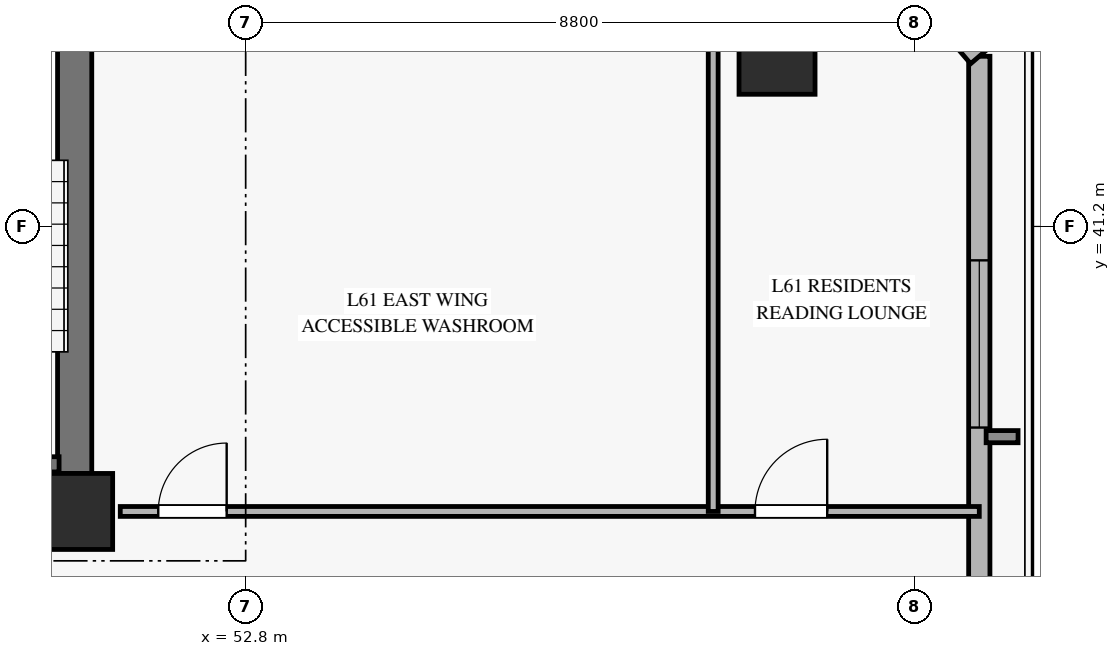
"""IFC4 building model, lengths in metres.
Left out: names, types, materials, properties, quantities, classifications, styles, units other than length and angle.
Written with IfcOpenShell. Run it as: python <this file> out.ifc"""

import sys

from ifc_helpers import new_model, si_unit, direction, frame, frame_2d, origin, origin_2d, place, context, subcontext, project, spatial, rectangle, hollow_rectangle, extrude, source, transform, mapped, element, fill, save


model = new_model("IFC4")
c1 = context("Model", 3, precision=1e-05, world=origin(), true_north=direction((0.0, 1.0)))
c2 = subcontext(c1, "Body", "Model", "MODEL_VIEW")
j1 = project(units=[si_unit("LENGTHUNIT", "METRE"), si_unit("PLANEANGLEUNIT", "RADIAN")], contexts=[c1])
p1 = place(None, origin())
s1 = spatial("IfcSite", under=j1, at=p1, CompositionType="ELEMENT")
p2 = place(p1, origin())
s2 = spatial("IfcBuilding", under=s1, at=p2, CompositionType="ELEMENT")
p3 = place(p2, frame((0.0, 0.0, 241.7)))
s3 = spatial("IfcBuildingStorey", under=s2, at=p3, CompositionType="ELEMENT", Elevation=241.7)
m1 = source(origin(), c2, "Body", "SweptSolid", [
    extrude(rectangle(XDim=1.0, YDim=1.0, at=origin_2d()), origin(), (0.0, 0.0, 1.0), 3.185),
])
p4 = place(p3, frame((50.55, 37.45, 0.0), z_axis=(0.0, 0.0, 1.0), x_axis=(1.0, 0.0, 0.0)))
e1 = element("IfcColumn", 1, at=p4, inside=s3, PredefinedType="PILASTER", context=c2, shape_type="MappedRepresentation", body=[
    mapped(m1, transform((0.0, 0.0, 0.0), x_axis=(1.0, 0.0, 0.0), y_axis=(0.0, 1.0, 0.0), z_axis=(0.0, 0.0, 1.0), scale=1.0)),
])
p5 = place(p3, frame((50.55, 37.95, 0.0), z_axis=(0.0, 0.0, 1.0), x_axis=(0.0, 1.0, 0.0)))
e2 = element("IfcWall", 2, at=p5, inside=s3, PredefinedType="SHEAR", context=c2, shape_type="SweptSolid", body=[
    extrude(rectangle(XDim=8.1, YDim=0.45, at=frame_2d((4.05, 0.0))), origin(), (0.0, 0.0, 1.0), 3.185),
])
m2 = source(origin(), c2, "Body", "SweptSolid", [
    extrude(hollow_rectangle(XDim=1.0, YDim=1.0, WallThickness=0.045, at=origin_2d()), origin(), (0.0, 0.0, 1.0), 3.185),
])
p6 = place(p3, frame((59.791, 43.439, 0.0), z_axis=(0.0, 0.0, 1.0), x_axis=(1.0, 0.0, 0.0)))
e3 = element("IfcColumn", 3, at=p6, inside=s3, PredefinedType="COLUMN", context=c2, shape_type="MappedRepresentation", body=[
    mapped(m2, transform((0.0, 0.0, 0.0), x_axis=(1.0, 0.0, 0.0), y_axis=(0.0, 1.0, 0.0), z_axis=(0.0, 0.0, 1.0), scale=1.0)),
])
p7 = place(p3, frame((62.452, 30.391, 0.0), z_axis=(0.0, 0.0, 1.0), x_axis=(0.0, 1.0, 0.0)))
e4 = element("IfcWall", 4, at=p7, inside=s3, PredefinedType="SOLIDWALL", context=c2, shape_type="SweptSolid", body=[
    extrude(rectangle(XDim=13.048, YDim=0.28, at=frame_2d((6.524, 0.0))), origin(), (0.0, 0.0, 1.0), 2.815),
])
p8 = place(p7, frame((8.163, 0.0, 0.45)))
e5 = element("IfcOpeningElement", 5, at=p8, cuts=e4, PredefinedType="OPENING", context=c2, shape_type="SweptSolid", body=[
    extrude(rectangle(XDim=2.2, YDim=2.1, at=frame_2d((1.1, 1.05))), frame((0.0, 0.15, 0.0), z_axis=(0.0, -1.0, 0.0), x_axis=(1.0, 0.0, 0.0)), (0.0, 0.0, 1.0), 0.3),
])
p9 = place(p3, frame((62.452, 43.439, 0.0), z_axis=(0.0, 0.0, 1.0), x_axis=(-0.651013940872, 0.759065773692, 0.0)))
e6 = element("IfcWall", 6, at=p9, inside=s3, PredefinedType="SOLIDWALL", context=c2, shape_type="SweptSolid", body=[
    extrude(rectangle(XDim=3.703, YDim=0.3, at=frame_2d((1.852, 0.0))), origin(), (0.0, 0.0, 1.0), 2.815),
])
p10 = place(p9, frame((1.052, 0.0, 0.45)))
e7 = element("IfcOpeningElement", 7, at=p10, cuts=e6, PredefinedType="OPENING", context=c2, shape_type="SweptSolid", body=[
    extrude(rectangle(XDim=1.6, YDim=2.0, at=frame_2d((0.8, 1.0))), frame((0.0, 0.16, 0.0), z_axis=(0.0, -1.0, 0.0), x_axis=(1.0, 0.0, 0.0)), (0.0, 0.0, 1.0), 0.32),
])
p11 = place(p3, frame((47.44, 38.07, 0.0), z_axis=(0.0, 0.0, 1.0), x_axis=(1.0, 0.0, 0.0)))
e8 = element("IfcWall", 8, at=p11, inside=s3, PredefinedType="SOLIDWALL", context=c2, shape_type="SweptSolid", body=[
    extrude(rectangle(XDim=2.905, YDim=0.2, at=frame_2d((1.453, 0.0))), origin(), (0.0, 0.0, 1.0), 3.4),
])
p12 = place(p3, frame((51.15, 37.45, 0.0), z_axis=(0.0, 0.0, 1.0), x_axis=(1.0, 0.0, 0.0)))
e9 = element("IfcWall", 9, at=p12, inside=s3, PredefinedType="PARTITIONING", context=c2, shape_type="SweptSolid", body=[
    extrude(rectangle(XDim=11.302, YDim=0.13, at=frame_2d((5.651, 0.0))), origin(), (0.0, 0.0, 1.0), 2.82),
])
p13 = place(p12, frame((0.5, 0.0, 0.0)))
e10 = element("IfcOpeningElement", 10, at=p13, cuts=e9, PredefinedType="OPENING", context=c2, shape_type="SweptSolid", body=[
    extrude(rectangle(XDim=0.9, YDim=2.1, at=frame_2d((0.45, 1.05))), frame((0.0, 0.075, 0.0), z_axis=(0.0, -1.0, 0.0), x_axis=(1.0, 0.0, 0.0)), (0.0, 0.0, 1.0), 0.15),
])
p14 = place(p12, frame((8.351, 0.0, 0.0)))
e11 = element("IfcOpeningElement", 11, at=p14, cuts=e9, PredefinedType="OPENING", context=c2, shape_type="SweptSolid", body=[
    extrude(rectangle(XDim=0.95, YDim=2.1, at=frame_2d((0.475, 1.05))), frame((0.0, 0.075, 0.0), z_axis=(0.0, -1.0, 0.0), x_axis=(1.0, 0.0, 0.0)), (0.0, 0.0, 1.0), 0.15),
])
p15 = place(p3, frame((58.951, 37.45, 0.0), z_axis=(0.0, 0.0, 1.0), x_axis=(0.0, 1.0, 0.0)))
e12 = element("IfcWall", 12, at=p15, inside=s3, PredefinedType="PARTITIONING", context=c2, shape_type="SweptSolid", body=[
    extrude(rectangle(XDim=8.8, YDim=0.13, at=frame_2d((4.4, 0.0))), origin(), (0.0, 0.0, 1.0), 3.185),
])
m3 = source(origin(), c2, "Body", "SweptSolid", [
    extrude(rectangle(XDim=2.2, YDim=2.1, at=frame_2d((1.1, 1.05))), frame((0.0, 0.03, 0.0), z_axis=(0.0, -1.0, 0.0), x_axis=(1.0, 0.0, 0.0)), (0.0, 0.0, 1.0), 0.06),
])
p16 = place(p8, origin())
e13 = element("IfcWindow", 13, at=p16, inside=s3, PartitioningType="SINGLE_PANEL", PredefinedType="WINDOW", context=c2, shape_type="MappedRepresentation", body=[
    mapped(m3, transform((0.0, 0.0, 0.0), x_axis=(1.0, 0.0, 0.0), y_axis=(0.0, 1.0, 0.0), z_axis=(0.0, 0.0, 1.0), scale=1.0)),
])
fill(e5, e13)
m4 = source(origin(), c2, "Body", "SweptSolid", [
    extrude(rectangle(XDim=0.9, YDim=2.1, at=frame_2d((0.45, 1.05))), frame((0.0, 0.025, 0.0), z_axis=(0.0, -1.0, 0.0), x_axis=(1.0, 0.0, 0.0)), (0.0, 0.0, 1.0), 0.05),
])
p17 = place(p13, origin())
e14 = element("IfcDoor", 14, at=p17, inside=s3, OperationType="SINGLE_SWING_RIGHT", PredefinedType="DOOR", context=c2, shape_type="MappedRepresentation", body=[
    mapped(m4, transform((0.0, 0.0, 0.0), x_axis=(1.0, 0.0, 0.0), y_axis=(0.0, 1.0, 0.0), z_axis=(0.0, 0.0, 1.0), scale=1.0)),
])
fill(e10, e14)
m5 = source(origin(), c2, "Body", "SweptSolid", [
    extrude(rectangle(XDim=0.95, YDim=2.1, at=frame_2d((0.475, 1.05))), frame((0.0, 0.025, 0.0), z_axis=(0.0, -1.0, 0.0), x_axis=(1.0, 0.0, 0.0)), (0.0, 0.0, 1.0), 0.05),
])
p18 = place(p14, origin())
e15 = element("IfcDoor", 15, at=p18, inside=s3, OperationType="SINGLE_SWING_RIGHT", PredefinedType="DOOR", context=c2, shape_type="MappedRepresentation", body=[
    mapped(m5, transform((0.0, 0.0, 0.0), x_axis=(1.0, 0.0, 0.0), y_axis=(0.0, 1.0, 0.0), z_axis=(0.0, 0.0, 1.0), scale=1.0)),
])
fill(e11, e15)
save(model, sys.argv[1])
